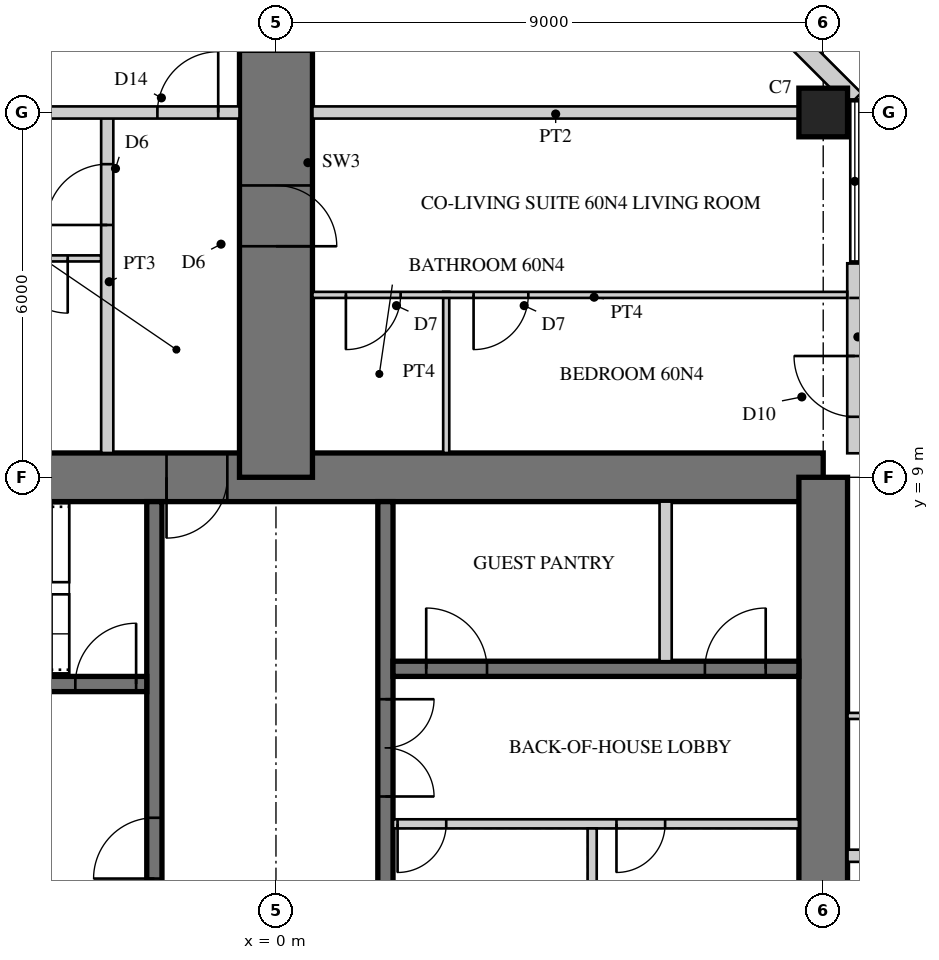
"""IFC4 building model, lengths in metres.
Left out: names, types, materials, properties, quantities, classifications, styles, units other than length and angle.
Written with IfcOpenShell. Run it as: python <this file> out.ifc"""

import sys

from ifc_helpers import new_model, si_unit, direction, frame, frame_2d, origin, origin_2d, place, context, subcontext, project, spatial, rectangle, hollow_rectangle, extrude, element, fill, save


model = new_model("IFC4")
c1 = context("Model", 3, precision=1e-05, world=origin(), true_north=direction((0.0, 1.0)))
c2 = subcontext(c1, "Body", "Model", "MODEL_VIEW")
j1 = project(units=[si_unit("LENGTHUNIT", "METRE"), si_unit("PLANEANGLEUNIT", "RADIAN")], contexts=[c1])
p1 = place(None, origin())
s1 = spatial("IfcSite", under=j1, at=p1, CompositionType="ELEMENT")
p2 = place(p1, origin())
s2 = spatial("IfcBuilding", under=s1, at=p2, CompositionType="ELEMENT")
p3 = place(p2, frame((0.0, 0.0, 235.7)))
s3 = spatial("IfcBuildingStorey", under=s2, at=p3, CompositionType="ELEMENT", Elevation=235.7)
p4 = place(p3, frame((9.0, 9.0, 0.0), z_axis=(0.0, 0.0, 1.0), x_axis=(-1.0, 0.0, 0.0)))
e1 = element("IfcWall", 1, at=p4, inside=s3, PredefinedType="SHEAR", context=c2, shape_type="SweptSolid", body=[
    extrude(rectangle(XDim=18.0, YDim=0.8, at=frame_2d((9.0, 0.0))), origin(), (0.0, 0.0, 1.0), 3.4),
])
p5 = place(p4, frame((9.8, 0.0, 0.0)))
e2 = element("IfcOpeningElement", 2, at=p5, cuts=e1, PredefinedType="OPENING", context=c2, shape_type="SweptSolid", body=[
    extrude(rectangle(XDim=1.0, YDim=2.4, at=frame_2d((0.5, 1.2))), frame((0.0, 0.41, 0.0), z_axis=(0.0, -1.0, 0.0), x_axis=(1.0, 0.0, 0.0)), (0.0, 0.0, 1.0), 0.82),
])
p6 = place(p3, frame((9.0, -9.0, 0.0), z_axis=(0.0, 0.0, 1.0), x_axis=(0.0, 1.0, 0.0)))
e3 = element("IfcWall", 3, at=p6, inside=s3, PredefinedType="SHEAR", context=c2, shape_type="SweptSolid", body=[
    extrude(rectangle(XDim=18.0, YDim=0.8, at=frame_2d((9.0, 0.0))), origin(), (0.0, 0.0, 1.0), 3.4),
])
p7 = place(p6, frame((9.8, 0.0, 0.0)))
e4 = element("IfcOpeningElement", 4, at=p7, cuts=e3, PredefinedType="OPENING", context=c2, shape_type="SweptSolid", body=[
    extrude(rectangle(XDim=1.0, YDim=2.4, at=frame_2d((0.5, 1.2))), frame((0.0, 0.41, 0.0), z_axis=(0.0, -1.0, 0.0), x_axis=(1.0, 0.0, 0.0)), (0.0, 0.0, 1.0), 0.82),
])
p8 = place(p3, frame((1.8, 1.875, 0.0), z_axis=(0.0, 0.0, 1.0), x_axis=(0.0, 1.0, 0.0)))
e5 = element("IfcWall", 5, at=p8, inside=s3, PredefinedType="SHEAR", context=c2, shape_type="SweptSolid", body=[
    extrude(rectangle(XDim=6.725, YDim=0.25, at=frame_2d((3.363, 0.0))), origin(), (0.0, 0.0, 1.0), 3.4),
])
p9 = place(p8, frame((1.875, 0.0, 0.0)))
e6 = element("IfcOpeningElement", 6, at=p9, cuts=e5, PredefinedType="OPENING", context=c2, shape_type="SweptSolid", body=[
    extrude(rectangle(XDim=1.6, YDim=2.4, at=frame_2d((0.8, 1.2))), frame((0.0, 0.135, 0.0), z_axis=(0.0, -1.0, 0.0), x_axis=(1.0, 0.0, 0.0)), (0.0, 0.0, 1.0), 0.27),
])
p10 = place(p3, frame((1.925, 5.85, 0.0), z_axis=(0.0, 0.0, 1.0), x_axis=(1.0, 0.0, 0.0)))
e7 = element("IfcWall", 7, at=p10, inside=s3, PredefinedType="SHEAR", context=c2, shape_type="SweptSolid", body=[
    extrude(rectangle(XDim=6.675, YDim=0.25, at=frame_2d((3.337, 0.0))), origin(), (0.0, 0.0, 1.0), 3.4),
])
p11 = place(p10, frame((0.546, 0.0, 0.0)))
e8 = element("IfcOpeningElement", 8, at=p11, cuts=e7, PredefinedType="OPENING", context=c2, shape_type="SweptSolid", body=[
    extrude(rectangle(XDim=1.0, YDim=2.1, at=frame_2d((0.5, 1.05))), frame((0.0, 0.135, 0.0), z_axis=(0.0, -1.0, 0.0), x_axis=(1.0, 0.0, 0.0)), (0.0, 0.0, 1.0), 0.27),
])
p12 = place(p10, frame((5.129, 0.0, 0.0)))
e9 = element("IfcOpeningElement", 9, at=p12, cuts=e7, PredefinedType="OPENING", context=c2, shape_type="SweptSolid", body=[
    extrude(rectangle(XDim=1.0, YDim=2.1, at=frame_2d((0.5, 1.05))), frame((0.0, 0.135, 0.0), z_axis=(0.0, -1.0, 0.0), x_axis=(1.0, 0.0, 0.0)), (0.0, 0.0, 1.0), 0.27),
])
p13 = place(p3, frame((1.925, 3.3, 0.0), z_axis=(0.0, 0.0, 1.0), x_axis=(1.0, 0.0, 0.0)))
e10 = element("IfcWall", 10, at=p13, inside=s3, PredefinedType="PARTITIONING", context=c2, shape_type="SweptSolid", body=[
    extrude(rectangle(XDim=6.675, YDim=0.15, at=frame_2d((3.337, 0.0))), origin(), (0.0, 0.0, 1.0), 3.4),
])
p14 = place(p13, frame((0.075, 0.0, 0.0)))
e11 = element("IfcOpeningElement", 11, at=p14, cuts=e10, PredefinedType="OPENING", context=c2, shape_type="SweptSolid", body=[
    extrude(rectangle(XDim=0.8, YDim=2.1, at=frame_2d((0.4, 1.05))), frame((0.0, 0.085, 0.0), z_axis=(0.0, -1.0, 0.0), x_axis=(1.0, 0.0, 0.0)), (0.0, 0.0, 1.0), 0.17),
])
p15 = place(p13, frame((3.675, 0.0, 0.0)))
e12 = element("IfcOpeningElement", 12, at=p15, cuts=e10, PredefinedType="OPENING", context=c2, shape_type="SweptSolid", body=[
    extrude(rectangle(XDim=0.8, YDim=2.1, at=frame_2d((0.4, 1.05))), frame((0.0, 0.085, 0.0), z_axis=(0.0, -1.0, 0.0), x_axis=(1.0, 0.0, 0.0)), (0.0, 0.0, 1.0), 0.17),
])
p16 = place(p3, frame((5.2, 2.125, 0.0), z_axis=(0.0, 0.0, 1.0), x_axis=(0.0, 1.0, 0.0)))
e13 = element("IfcWall", 13, at=p16, inside=s3, PredefinedType="PARTITIONING", context=c2, shape_type="SweptSolid", body=[
    extrude(rectangle(XDim=1.1, YDim=0.15, at=frame_2d((0.55, 0.0))), origin(), (0.0, 0.0, 1.0), 3.4),
])
p17 = place(p3, frame((6.408, 5.975, 0.0), z_axis=(0.0, 0.0, 1.0), x_axis=(0.0, 1.0, 0.0)))
e14 = element("IfcWall", 14, at=p17, inside=s3, PredefinedType="PARTITIONING", context=c2, shape_type="SweptSolid", body=[
    extrude(rectangle(XDim=2.625, YDim=0.2, at=frame_2d((1.312, 0.0))), origin(), (0.0, 0.0, 1.0), 3.4),
])
p18 = place(p3, frame((-2.0, 1.675, 0.0), z_axis=(0.0, 0.0, 1.0), x_axis=(0.0, 1.0, 0.0)))
e15 = element("IfcWall", 15, at=p18, inside=s3, PredefinedType="SHEAR", context=c2, shape_type="SweptSolid", body=[
    extrude(rectangle(XDim=6.925, YDim=0.25, at=frame_2d((3.462, 0.0))), origin(), (0.0, 0.0, 1.0), 3.4),
])
p19 = place(p18, frame((0.725, 0.0, 0.0)))
e16 = element("IfcOpeningElement", 16, at=p19, cuts=e15, PredefinedType="OPENING", context=c2, shape_type="SweptSolid", body=[
    extrude(rectangle(XDim=1.0, YDim=2.1, at=frame_2d((0.5, 1.05))), frame((0.0, 0.135, 0.0), z_axis=(0.0, -1.0, 0.0), x_axis=(1.0, 0.0, 0.0)), (0.0, 0.0, 1.0), 0.27),
])
p20 = place(p3, frame((-2.125, 5.6, 0.0), z_axis=(0.0, 0.0, 1.0), x_axis=(-1.0, 0.0, 0.0)))
e17 = element("IfcWall", 17, at=p20, inside=s3, PredefinedType="SHEAR", context=c2, shape_type="SweptSolid", body=[
    extrude(rectangle(XDim=6.475, YDim=0.25, at=frame_2d((3.238, 0.0))), origin(), (0.0, 0.0, 1.0), 3.4),
])
p21 = place(p20, frame((0.175, 0.0, 0.0)))
e18 = element("IfcOpeningElement", 18, at=p21, cuts=e17, PredefinedType="OPENING", context=c2, shape_type="SweptSolid", body=[
    extrude(rectangle(XDim=1.0, YDim=2.1, at=frame_2d((0.5, 1.05))), frame((0.0, 0.135, 0.0), z_axis=(0.0, -1.0, 0.0), x_axis=(1.0, 0.0, 0.0)), (0.0, 0.0, 1.0), 0.27),
])
p22 = place(p3, frame((0.0, 9.0, 0.0), z_axis=(0.0, 0.0, 1.0), x_axis=(0.0, 1.0, 0.0)))
e19 = element("IfcWall", 19, at=p22, inside=s3, PredefinedType="SHEAR", context=c2, shape_type="SweptSolid", body=[
    extrude(rectangle(XDim=9.0, YDim=1.2, at=frame_2d((4.5, 0.0))), origin(), (0.0, 0.0, 1.0), 3.4),
])
p23 = place(p22, frame((3.8, 0.0, 0.0)))
e20 = element("IfcOpeningElement", 20, at=p23, cuts=e19, PredefinedType="OPENING", context=c2, shape_type="SweptSolid", body=[
    extrude(rectangle(XDim=1.0, YDim=2.15, at=frame_2d((0.5, 1.075))), frame((0.0, 0.61, 0.0), z_axis=(0.0, -1.0, 0.0), x_axis=(1.0, 0.0, 0.0)), (0.0, 0.0, 1.0), 1.22),
])
p24 = place(p22, frame((7.0, 0.0, 0.0)))
e21 = element("IfcOpeningElement", 21, at=p24, cuts=e19, PredefinedType="OPENING", context=c2, shape_type="SweptSolid", body=[
    extrude(rectangle(XDim=1.0, YDim=2.2, at=frame_2d((0.5, 1.1))), frame((0.0, 0.61, 0.0), z_axis=(0.0, -1.0, 0.0), x_axis=(1.0, 0.0, 0.0)), (0.0, 0.0, 1.0), 1.22),
])
p25 = place(p3, frame((9.0, 15.0, 0.0), z_axis=(0.0, 0.0, 1.0), x_axis=(1.0, 0.0, 0.0)))
e22 = element("IfcColumn", 22, at=p25, inside=s3, PredefinedType="COLUMN", context=c2, shape_type="SweptSolid", body=[
    extrude(rectangle(XDim=0.8, YDim=0.8, at=origin_2d()), origin(), (0.0, 0.0, 1.0), 3.4),
])
p26 = place(p3, frame((9.52, 9.395, 0.0), z_axis=(0.0, 0.0, 1.0), x_axis=(0.0, 1.0, 0.0)))
e23 = element("IfcWall", 23, at=p26, inside=s3, PredefinedType="SOLIDWALL", context=c2, shape_type="SweptSolid", body=[
    extrude(rectangle(XDim=3.125, YDim=0.25, at=frame_2d((1.562, 0.0))), origin(), (0.0, 0.0, 1.0), 3.22),
])
p27 = place(p26, frame((0.6, 0.0, 0.0)))
e24 = element("IfcOpeningElement", 24, at=p27, cuts=e23, PredefinedType="OPENING", context=c2, shape_type="SweptSolid", body=[
    extrude(rectangle(XDim=1.0, YDim=2.2, at=frame_2d((0.5, 1.1))), frame((0.0, 0.135, 0.0), z_axis=(0.0, -1.0, 0.0), x_axis=(1.0, 0.0, 0.0)), (0.0, 0.0, 1.0), 0.27),
])
p28 = place(p3, frame((9.52, 15.215, 0.0), z_axis=(0.0, 0.0, 1.0), x_axis=(-0.707081278264, 0.707132283189, 0.0)))
e25 = element("IfcWall", 25, at=p28, inside=s3, PredefinedType="SOLIDWALL", context=c2, shape_type="SweptSolid", body=[
    extrude(rectangle(XDim=4.787, YDim=0.3, at=frame_2d((2.393, 0.0))), origin(), (0.0, 0.0, 1.0), 3.22),
])
p29 = place(p28, frame((1.943, 0.0, 0.3)))
e26 = element("IfcOpeningElement", 26, at=p29, cuts=e25, PredefinedType="OPENING", context=c2, shape_type="SweptSolid", body=[
    extrude(rectangle(XDim=0.9, YDim=2.4, at=frame_2d((0.45, 1.2))), frame((0.0, 0.16, 0.0), z_axis=(0.0, -1.0, 0.0), x_axis=(1.0, 0.0, 0.0)), (0.0, 0.0, 1.0), 0.32),
])
p30 = place(p3, frame((-2.875, 12.6, 0.0), z_axis=(0.0, 0.0, 1.0), x_axis=(-1.0, 0.0, 0.0)))
e27 = element("IfcWall", 27, at=p30, inside=s3, PredefinedType="PARTITIONING", context=c2, shape_type="SweptSolid", body=[
    extrude(rectangle(XDim=6.605, YDim=0.1, at=frame_2d((3.302, 0.0))), origin(), (0.0, 0.0, 1.0), 3.22),
])
p31 = place(p30, frame((0.55, 0.0, 0.0)))
e28 = element("IfcOpeningElement", 28, at=p31, cuts=e27, PredefinedType="OPENING", context=c2, shape_type="SweptSolid", body=[
    extrude(rectangle(XDim=0.9, YDim=2.1, at=frame_2d((0.45, 1.05))), frame((0.0, 0.06, 0.0), z_axis=(0.0, -1.0, 0.0), x_axis=(1.0, 0.0, 0.0)), (0.0, 0.0, 1.0), 0.12),
])
p32 = place(p30, frame((2.65, 0.0, 0.0)))
e29 = element("IfcOpeningElement", 29, at=p32, cuts=e27, PredefinedType="OPENING", context=c2, shape_type="SweptSolid", body=[
    extrude(rectangle(XDim=0.9, YDim=2.1, at=frame_2d((0.45, 1.05))), frame((0.0, 0.06, 0.0), z_axis=(0.0, -1.0, 0.0), x_axis=(1.0, 0.0, 0.0)), (0.0, 0.0, 1.0), 0.12),
])
p33 = place(p3, frame((2.8, 9.4, 0.0), z_axis=(0.0, 0.0, 1.0), x_axis=(0.0, 1.0, 0.0)))
e30 = element("IfcWall", 30, at=p33, inside=s3, PredefinedType="PARTITIONING", context=c2, shape_type="SweptSolid", body=[
    extrude(rectangle(XDim=2.65, YDim=0.1, at=frame_2d((1.325, 0.0))), origin(), (0.0, 0.0, 1.0), 3.22),
])
p34 = place(p3, frame((9.395, 12.0, 0.0), z_axis=(0.0, 0.0, 1.0), x_axis=(-1.0, 0.0, 0.0)))
e31 = element("IfcWall", 31, at=p34, inside=s3, PredefinedType="PARTITIONING", context=c2, shape_type="SweptSolid", body=[
    extrude(rectangle(XDim=8.795, YDim=0.1, at=frame_2d((4.397, 0.0))), origin(), (0.0, 0.0, 1.0), 3.22),
])
p35 = place(p34, frame((5.245, 0.0, 0.0)))
e32 = element("IfcOpeningElement", 32, at=p35, cuts=e31, PredefinedType="OPENING", context=c2, shape_type="SweptSolid", body=[
    extrude(rectangle(XDim=0.9, YDim=2.1, at=frame_2d((0.45, 1.05))), frame((0.0, 0.06, 0.0), z_axis=(0.0, -1.0, 0.0), x_axis=(1.0, 0.0, 0.0)), (0.0, 0.0, 1.0), 0.12),
])
p36 = place(p34, frame((7.345, 0.0, 0.0)))
e33 = element("IfcOpeningElement", 33, at=p36, cuts=e31, PredefinedType="OPENING", context=c2, shape_type="SweptSolid", body=[
    extrude(rectangle(XDim=0.9, YDim=2.1, at=frame_2d((0.45, 1.05))), frame((0.0, 0.06, 0.0), z_axis=(0.0, -1.0, 0.0), x_axis=(1.0, 0.0, 0.0)), (0.0, 0.0, 1.0), 0.12),
])
p37 = place(p3, frame((-2.775, 9.4, 0.0), z_axis=(0.0, 0.0, 1.0), x_axis=(0.0, 1.0, 0.0)))
e34 = element("IfcWall", 34, at=p37, inside=s3, PredefinedType="SOLIDWALL", context=c2, shape_type="SweptSolid", body=[
    extrude(rectangle(XDim=5.6, YDim=0.2, at=frame_2d((2.8, 0.0))), origin(), (0.0, 0.0, 1.0), 3.22),
])
p38 = place(p37, frame((3.75, 0.0, 0.0)))
e35 = element("IfcOpeningElement", 35, at=p38, cuts=e34, PredefinedType="OPENING", context=c2, shape_type="SweptSolid", body=[
    extrude(rectangle(XDim=1.0, YDim=2.15, at=frame_2d((0.5, 1.075))), frame((0.0, 0.11, 0.0), z_axis=(0.0, -1.0, 0.0), x_axis=(1.0, 0.0, 0.0)), (0.0, 0.0, 1.0), 0.22),
])
p39 = place(p3, frame((8.6, 15.0, 0.0), z_axis=(0.0, 0.0, 1.0), x_axis=(-1.0, 0.0, 0.0)))
e36 = element("IfcWall", 36, at=p39, inside=s3, PredefinedType="SOLIDWALL", context=c2, shape_type="SweptSolid", body=[
    extrude(rectangle(XDim=8.0, YDim=0.2, at=frame_2d((4.0, 0.0))), origin(), (0.0, 0.0, 1.0), 2.52),
])
p40 = place(p3, frame((-0.6, 15.0, 0.0), z_axis=(0.0, 0.0, 1.0), x_axis=(-1.0, 0.0, 0.0)))
e37 = element("IfcWall", 37, at=p40, inside=s3, PredefinedType="SOLIDWALL", context=c2, shape_type="SweptSolid", body=[
    extrude(rectangle(XDim=8.0, YDim=0.2, at=frame_2d((4.0, 0.0))), origin(), (0.0, 0.0, 1.0), 2.52),
])
p41 = place(p40, frame((0.35, 0.0, 0.0)))
e38 = element("IfcOpeningElement", 38, at=p41, cuts=e37, PredefinedType="OPENING", context=c2, shape_type="SweptSolid", body=[
    extrude(rectangle(XDim=1.0, YDim=2.2, at=frame_2d((0.5, 1.1))), frame((0.0, 0.11, 0.0), z_axis=(0.0, -1.0, 0.0), x_axis=(1.0, 0.0, 0.0)), (0.0, 0.0, 1.0), 0.22),
])
p42 = place(p3, frame((9.4, 5.075, 0.0), z_axis=(0.0, 0.0, 1.0), x_axis=(1.0, 0.0, 0.0)))
e39 = element("IfcWall", 39, at=p42, inside=s3, PredefinedType="PARTITIONING", context=c2, shape_type="SweptSolid", body=[
    extrude(rectangle(XDim=3.25, YDim=0.1, at=frame_2d((1.625, 0.0))), origin(), (0.0, 0.0, 1.0), 3.22),
])
p43 = place(p3, frame((9.4, 2.775, 0.0), z_axis=(0.0, 0.0, 1.0), x_axis=(1.0, 0.0, 0.0)))
e40 = element("IfcWall", 40, at=p43, inside=s3, PredefinedType="SOLIDWALL", context=c2, shape_type="SweptSolid", body=[
    extrude(rectangle(XDim=5.6, YDim=0.2, at=frame_2d((2.8, 0.0))), origin(), (0.0, 0.0, 1.0), 3.22),
])
p44 = place(p43, frame((3.75, 0.0, 0.0)))
e41 = element("IfcOpeningElement", 41, at=p44, cuts=e40, PredefinedType="OPENING", context=c2, shape_type="SweptSolid", body=[
    extrude(rectangle(XDim=1.0, YDim=2.15, at=frame_2d((0.5, 1.075))), frame((0.0, 0.11, 0.0), z_axis=(0.0, -1.0, 0.0), x_axis=(1.0, 0.0, 0.0)), (0.0, 0.0, 1.0), 0.22),
])
p45 = place(p27, origin())
e42 = element("IfcDoor", 42, at=p45, inside=s3, OperationType="SINGLE_SWING_RIGHT", PredefinedType="DOOR", context=c2, shape_type="SweptSolid", body=[
    extrude(hollow_rectangle(XDim=1.0, YDim=2.2, WallThickness=0.06, at=frame_2d((0.5, 1.1))), frame((0.0, 0.025, 0.0), z_axis=(0.0, -1.0, 0.0), x_axis=(1.0, 0.0, 0.0)), (0.0, 0.0, 1.0), 0.05),
    extrude(rectangle(XDim=0.879, YDim=2.079, at=frame_2d((0.5, 1.1))), frame((0.0, 0.025, 0.0), z_axis=(0.0, -1.0, 0.0), x_axis=(1.0, 0.0, 0.0)), (0.0, 0.0, 1.0), 0.05),
])
fill(e24, e42)
p46 = place(p31, origin())
e43 = element("IfcDoor", 43, at=p46, inside=s3, OperationType="SINGLE_SWING_LEFT", PredefinedType="DOOR", context=c2, shape_type="SweptSolid", body=[
    extrude(rectangle(XDim=0.9, YDim=2.1, at=frame_2d((0.45, 1.05))), frame((0.0, 0.025, 0.0), z_axis=(0.0, -1.0, 0.0), x_axis=(1.0, 0.0, 0.0)), (0.0, 0.0, 1.0), 0.05),
])
fill(e28, e43)
p47 = place(p35, origin())
e44 = element("IfcDoor", 44, at=p47, inside=s3, OperationType="SINGLE_SWING_RIGHT", PredefinedType="DOOR", context=c2, shape_type="SweptSolid", body=[
    extrude(rectangle(XDim=0.9, YDim=2.1, at=frame_2d((0.45, 1.05))), frame((0.0, 0.025, 0.0), z_axis=(0.0, -1.0, 0.0), x_axis=(1.0, 0.0, 0.0)), (0.0, 0.0, 1.0), 0.05),
])
fill(e32, e44)
p48 = place(p36, origin())
e45 = element("IfcDoor", 45, at=p48, inside=s3, OperationType="SINGLE_SWING_RIGHT", PredefinedType="DOOR", context=c2, shape_type="SweptSolid", body=[
    extrude(rectangle(XDim=0.9, YDim=2.1, at=frame_2d((0.45, 1.05))), frame((0.0, 0.025, 0.0), z_axis=(0.0, -1.0, 0.0), x_axis=(1.0, 0.0, 0.0)), (0.0, 0.0, 1.0), 0.05),
])
fill(e33, e45)
p49 = place(p38, origin())
e46 = element("IfcDoor", 46, at=p49, inside=s3, OperationType="SINGLE_SWING_LEFT", PredefinedType="DOOR", context=c2, shape_type="SweptSolid", body=[
    extrude(rectangle(XDim=1.0, YDim=2.15, at=frame_2d((0.5, 1.075))), frame((0.0, 0.025, 0.0), z_axis=(0.0, -1.0, 0.0), x_axis=(1.0, 0.0, 0.0)), (0.0, 0.0, 1.0), 0.05),
])
fill(e35, e46)
p50 = place(p41, frame((1.0, 0.0, 0.0), z_axis=(0.0, 0.0, 1.0), x_axis=(-1.0, 0.0, 0.0)))
e47 = element("IfcDoor", 47, at=p50, inside=s3, OperationType="SINGLE_SWING_RIGHT", PredefinedType="DOOR", context=c2, shape_type="SweptSolid", body=[
    extrude(rectangle(XDim=1.0, YDim=2.2, at=frame_2d((0.5, 1.1))), frame((0.0, 0.025, 0.0), z_axis=(0.0, -1.0, 0.0), x_axis=(1.0, 0.0, 0.0)), (0.0, 0.0, 1.0), 0.05),
])
fill(e38, e47)
p51 = place(p23, frame((1.0, 0.0, 0.0), z_axis=(0.0, 0.0, 1.0), x_axis=(-1.0, 0.0, 0.0)))
e48 = element("IfcDoor", 48, at=p51, inside=s3, OperationType="SINGLE_SWING_RIGHT", PredefinedType="DOOR", context=c2, shape_type="SweptSolid", body=[
    extrude(rectangle(XDim=1.0, YDim=2.15, at=frame_2d((0.5, 1.075))), frame((0.0, 0.025, 0.0), z_axis=(0.0, -1.0, 0.0), x_axis=(1.0, 0.0, 0.0)), (0.0, 0.0, 1.0), 0.05),
])
fill(e20, e48)
p52 = place(p5, origin())
e49 = element("IfcDoor", 49, at=p52, inside=s3, OperationType="SINGLE_SWING_RIGHT", PredefinedType="DOOR", context=c2, shape_type="SweptSolid", body=[
    extrude(rectangle(XDim=1.0, YDim=2.4, at=frame_2d((0.5, 1.2))), frame((0.0, 0.055, 0.0), z_axis=(0.0, -1.0, 0.0), x_axis=(1.0, 0.0, 0.0)), (0.0, 0.0, 1.0), 0.05),
])
fill(e2, e49)
p53 = place(p9, frame((1.6, 0.0, 0.0), z_axis=(0.0, 0.0, 1.0), x_axis=(-1.0, 0.0, 0.0)))
e50 = element("IfcDoor", 50, at=p53, inside=s3, OperationType="DOUBLE_DOOR_SINGLE_SWING", PredefinedType="DOOR", context=c2, shape_type="SweptSolid", body=[
    extrude(rectangle(XDim=1.6, YDim=2.4, at=frame_2d((0.8, 1.2))), frame((0.0, 0.025, 0.0), z_axis=(0.0, -1.0, 0.0), x_axis=(1.0, 0.0, 0.0)), (0.0, 0.0, 1.0), 0.05),
])
fill(e6, e50)
p54 = place(p14, frame((0.8, 0.0, 0.0), z_axis=(0.0, 0.0, 1.0), x_axis=(-1.0, 0.0, 0.0)))
e51 = element("IfcDoor", 51, at=p54, inside=s3, OperationType="SINGLE_SWING_RIGHT", PredefinedType="DOOR", context=c2, shape_type="SweptSolid", body=[
    extrude(rectangle(XDim=0.8, YDim=2.1, at=frame_2d((0.4, 1.05))), frame((0.0, 0.025, 0.0), z_axis=(0.0, -1.0, 0.0), x_axis=(1.0, 0.0, 0.0)), (0.0, 0.0, 1.0), 0.05),
])
fill(e11, e51)
p55 = place(p15, frame((0.8, 0.0, 0.0), z_axis=(0.0, 0.0, 1.0), x_axis=(-1.0, 0.0, 0.0)))
e52 = element("IfcDoor", 52, at=p55, inside=s3, OperationType="SINGLE_SWING_RIGHT", PredefinedType="DOOR", context=c2, shape_type="SweptSolid", body=[
    extrude(rectangle(XDim=0.8, YDim=2.1, at=frame_2d((0.4, 1.05))), frame((0.0, 0.025, 0.0), z_axis=(0.0, -1.0, 0.0), x_axis=(1.0, 0.0, 0.0)), (0.0, 0.0, 1.0), 0.05),
])
fill(e12, e52)
p56 = place(p19, origin())
e53 = element("IfcDoor", 53, at=p56, inside=s3, OperationType="SINGLE_SWING_LEFT", PredefinedType="DOOR", context=c2, shape_type="SweptSolid", body=[
    extrude(rectangle(XDim=1.0, YDim=2.1, at=frame_2d((0.5, 1.05))), frame((0.0, 0.025, 0.0), z_axis=(0.0, -1.0, 0.0), x_axis=(1.0, 0.0, 0.0)), (0.0, 0.0, 1.0), 0.05),
])
fill(e16, e53)
p57 = place(p21, frame((1.0, 0.0, 0.0), z_axis=(0.0, 0.0, 1.0), x_axis=(-1.0, 0.0, 0.0)))
e54 = element("IfcDoor", 54, at=p57, inside=s3, OperationType="SINGLE_SWING_RIGHT", PredefinedType="DOOR", context=c2, shape_type="SweptSolid", body=[
    extrude(rectangle(XDim=1.0, YDim=2.1, at=frame_2d((0.5, 1.05))), frame((0.0, 0.025, 0.0), z_axis=(0.0, -1.0, 0.0), x_axis=(1.0, 0.0, 0.0)), (0.0, 0.0, 1.0), 0.05),
])
fill(e18, e54)
p58 = place(p11, origin())
e55 = element("IfcDoor", 55, at=p58, inside=s3, OperationType="SINGLE_SWING_LEFT", PredefinedType="DOOR", context=c2, shape_type="SweptSolid", body=[
    extrude(rectangle(XDim=1.0, YDim=2.1, at=frame_2d((0.5, 1.05))), frame((0.0, 0.025, 0.0), z_axis=(0.0, -1.0, 0.0), x_axis=(1.0, 0.0, 0.0)), (0.0, 0.0, 1.0), 0.05),
])
fill(e8, e55)
p59 = place(p12, origin())
e56 = element("IfcDoor", 56, at=p59, inside=s3, OperationType="SINGLE_SWING_RIGHT", PredefinedType="DOOR", context=c2, shape_type="SweptSolid", body=[
    extrude(rectangle(XDim=1.0, YDim=2.1, at=frame_2d((0.5, 1.05))), frame((0.0, 0.025, 0.0), z_axis=(0.0, -1.0, 0.0), x_axis=(1.0, 0.0, 0.0)), (0.0, 0.0, 1.0), 0.05),
])
fill(e9, e56)
save(model, sys.argv[1])
